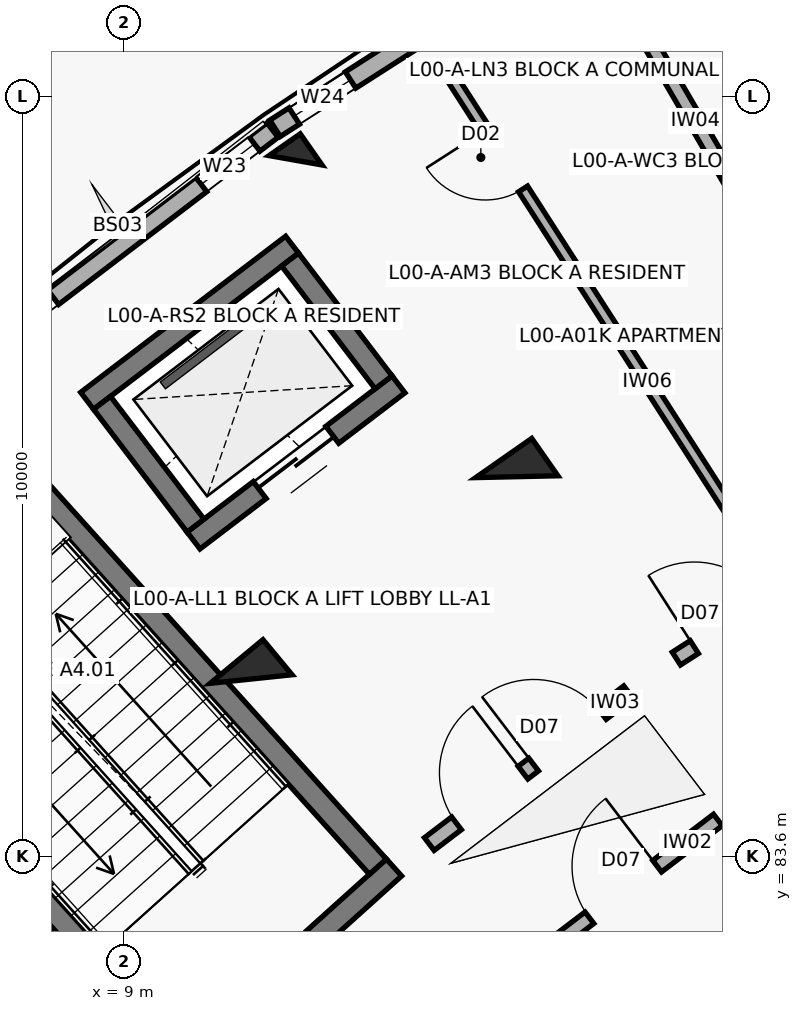
"""IFC4 building model, lengths in metres.
Left out: names, types, materials, properties, quantities, classifications, styles, units other than length and angle.
Written with IfcOpenShell. Run it as: python <this file> out.ifc"""

import sys

from ifc_helpers import new_model, si_unit, direction, frame, frame_2d, origin, origin_2d, place, context, subcontext, project, spatial, rectangle, extrude, element, fill, save


model = new_model("IFC4")
c1 = context("Model", 3, precision=1e-05, world=origin(), true_north=direction((0.0, 1.0)))
c2 = subcontext(c1, "Body", "Model", "MODEL_VIEW")
j1 = project(units=[si_unit("LENGTHUNIT", "METRE"), si_unit("PLANEANGLEUNIT", "RADIAN")], contexts=[c1])
p1 = place(None, origin())
s1 = spatial("IfcSite", under=j1, at=p1, CompositionType="ELEMENT")
p2 = place(p1, origin())
s2 = spatial("IfcBuilding", under=s1, at=p2, CompositionType="ELEMENT")
p3 = place(p2, origin())
s3 = spatial("IfcBuildingStorey", under=s2, at=p3, CompositionType="ELEMENT", Elevation=0.0)
for number, where, z_axis, x_axis in (
    (1, (10.678, 85.93, 0.0), (0.0, 0.0, 1.0), (-0.638, 0.77, 0.0)),
    (2, (14.172, 88.592, 0.0), (0.0, 0.0, 1.0), (-0.573, 0.82, 0.0)),
):
    element("IfcColumn", number, at=place(p3, frame(where, z_axis=z_axis, x_axis=x_axis)), inside=s3, PredefinedType="COLUMN", context=c2, shape_type="SweptSolid", body=[
        extrude(rectangle(XDim=0.6, YDim=0.9, at=origin_2d()), origin(), (0.0, 0.0, 1.0), 4.5),
    ])
p4 = place(p3, frame((11.261, 92.755, 0.0), z_axis=(0.0, 0.0, 1.0), x_axis=(-0.573004420611, 0.819552276527, 0.0)))
e3 = element("IfcColumn", 3, at=p4, inside=s3, PredefinedType="COLUMN", context=c2, shape_type="SweptSolid", body=[
    extrude(rectangle(XDim=0.5, YDim=0.5, at=origin_2d()), origin(), (0.0, 0.0, 1.0), 4.5),
])
p5 = place(p3, frame((7.134, 90.239, 0.0), z_axis=(0.0, 0.0, 1.0), x_axis=(0.795469013207, 0.605994264848, 0.0)))
e4 = element("IfcWall", 4, at=p5, inside=s3, PredefinedType="SOLIDWALL", context=c2, shape_type="SweptSolid", body=[
    extrude(rectangle(XDim=4.809, YDim=0.24, at=frame_2d((2.404, 0.0))), origin(), (0.0, 0.0, 1.0), 3.45),
])
p6 = place(p5, frame((0.3, 0.0, 0.3)))
e5 = element("IfcOpeningElement", 5, at=p6, cuts=e4, PredefinedType="OPENING", context=c2, shape_type="SweptSolid", body=[
    extrude(rectangle(XDim=0.88, YDim=1.42, at=frame_2d((0.44, 0.71))), frame((0.0, 0.13, 0.0), z_axis=(0.0, -1.0, 0.0), x_axis=(1.0, 0.0, 0.0)), (0.0, 0.0, 1.0), 0.26),
])
p7 = place(p5, frame((3.629, 0.0, 0.3)))
e6 = element("IfcOpeningElement", 6, at=p7, cuts=e4, PredefinedType="OPENING", context=c2, shape_type="SweptSolid", body=[
    extrude(rectangle(XDim=0.88, YDim=1.42, at=frame_2d((0.44, 0.71))), frame((0.0, 0.13, 0.0), z_axis=(0.0, -1.0, 0.0), x_axis=(1.0, 0.0, 0.0)), (0.0, 0.0, 1.0), 0.26),
])
p8 = place(p3, frame((10.992, 93.176, 0.0), z_axis=(0.0, 0.0, 1.0), x_axis=(0.84226218024, 0.539068103061, 0.0)))
e7 = element("IfcWall", 7, at=p8, inside=s3, PredefinedType="SOLIDWALL", context=c2, shape_type="SweptSolid", body=[
    extrude(rectangle(XDim=4.809, YDim=0.255, at=frame_2d((2.404, 0.0))), origin(), (0.0, 0.0, 1.0), 3.45),
])
p9 = place(p8, frame((0.3, 0.0, 0.3)))
e8 = element("IfcOpeningElement", 8, at=p9, cuts=e7, PredefinedType="OPENING", context=c2, shape_type="SweptSolid", body=[
    extrude(rectangle(XDim=0.88, YDim=1.56, at=frame_2d((0.44, 0.78))), frame((0.0, 0.137, 0.0), z_axis=(0.0, -1.0, 0.0), x_axis=(1.0, 0.0, 0.0)), (0.0, 0.0, 1.0), 0.275),
])
p10 = place(p8, frame((3.629, 0.0, 0.3)))
e9 = element("IfcOpeningElement", 9, at=p10, cuts=e7, PredefinedType="OPENING", context=c2, shape_type="SweptSolid", body=[
    extrude(rectangle(XDim=0.88, YDim=1.56, at=frame_2d((0.44, 0.78))), frame((0.0, 0.137, 0.0), z_axis=(0.0, -1.0, 0.0), x_axis=(1.0, 0.0, 0.0)), (0.0, 0.0, 1.0), 0.275),
])
p11 = place(p3, frame((12.557, 83.45, 0.0), z_axis=(0.0, 0.0, 1.0), x_axis=(-0.743375696158, -0.668874109501, 0.0)))
e10 = element("IfcWall", 10, at=p11, inside=s3, PredefinedType="SHEAR", context=c2, shape_type="SweptSolid", body=[
    extrude(rectangle(XDim=3.87, YDim=0.3, at=frame_2d((1.935, 0.0))), origin(), (0.0, 0.0, 1.0), 4.5),
])
p12 = place(p11, frame((1.41, 0.0, 0.0)))
e11 = element("IfcOpeningElement", 11, at=p12, cuts=e10, PredefinedType="OPENING", context=c2, shape_type="SweptSolid", body=[
    extrude(rectangle(XDim=1.05, YDim=2.15, at=frame_2d((0.525, 1.075))), frame((0.0, 0.16, 0.0), z_axis=(0.0, -1.0, 0.0), x_axis=(1.0, 0.0, 0.0)), (0.0, 0.0, 1.0), 0.32),
])
p13 = place(p3, frame((12.345, 83.461, 0.0), z_axis=(0.0, 0.0, 1.0), x_axis=(-0.668868253964, 0.743380964808, 0.0)))
e12 = element("IfcWall", 12, at=p13, inside=s3, PredefinedType="SHEAR", context=c2, shape_type="SweptSolid", body=[
    extrude(rectangle(XDim=7.69, YDim=0.3, at=frame_2d((3.845, 0.0))), origin(), (0.0, 0.0, 1.0), 4.5),
])
p14 = place(p3, frame((9.691, 81.073, 0.0), z_axis=(0.0, 0.0, 1.0), x_axis=(-0.668885797871, 0.743365179038, 0.0)))
e13 = element("IfcWall", 13, at=p14, inside=s3, PredefinedType="SHEAR", context=c2, shape_type="SweptSolid", body=[
    extrude(rectangle(XDim=7.69, YDim=0.3, at=frame_2d((3.845, 0.0))), origin(), (0.0, 0.0, 1.0), 4.5),
])
p15 = place(p3, frame((12.616, 89.807, 0.0), z_axis=(0.0, 0.0, 1.0), x_axis=(-0.795474703455, -0.605986795371, 0.0)))
e14 = element("IfcWall", 14, at=p15, inside=s3, PredefinedType="SHEAR", context=c2, shape_type="SweptSolid", body=[
    extrude(rectangle(XDim=3.39, YDim=0.28, at=frame_2d((1.695, 0.0))), origin(), (0.0, 0.0, 1.0), 4.5),
])
p16 = place(p15, frame((1.095, 0.0, 0.0)))
e15 = element("IfcOpeningElement", 15, at=p16, cuts=e14, PredefinedType="OPENING", context=c2, shape_type="SweptSolid", body=[
    extrude(rectangle(XDim=1.2, YDim=2.15, at=frame_2d((0.6, 1.075))), frame((0.0, 0.15, 0.0), z_axis=(0.0, -1.0, 0.0), x_axis=(1.0, 0.0, 0.0)), (0.0, 0.0, 1.0), 0.3),
])
p17 = place(p3, frame((11.216, 91.645, 0.0), z_axis=(0.0, 0.0, 1.0), x_axis=(-0.795439986025, -0.606032365994, 0.0)))
e16 = element("IfcWall", 16, at=p17, inside=s3, PredefinedType="SHEAR", context=c2, shape_type="SweptSolid", body=[
    extrude(rectangle(XDim=3.39, YDim=0.28, at=frame_2d((1.695, 0.0))), origin(), (0.0, 0.0, 1.0), 4.5),
])
p18 = place(p3, frame((12.42, 89.834, 0.0), z_axis=(0.0, 0.0, 1.0), x_axis=(-0.605948992168, 0.795503500238, 0.0)))
e17 = element("IfcWall", 17, at=p18, inside=s3, PredefinedType="SHEAR", context=c2, shape_type="SweptSolid", body=[
    extrude(rectangle(XDim=2.03, YDim=0.28, at=frame_2d((1.015, 0.0))), origin(), (0.0, 0.0, 1.0), 4.5),
])
p19 = place(p3, frame((9.946, 87.949, 0.0), z_axis=(0.0, 0.0, 1.0), x_axis=(-0.605891019062, 0.795547656033, 0.0)))
e18 = element("IfcWall", 18, at=p19, inside=s3, PredefinedType="SHEAR", context=c2, shape_type="SweptSolid", body=[
    extrude(rectangle(XDim=2.03, YDim=0.28, at=frame_2d((1.015, 0.0))), origin(), (0.0, 0.0, 1.0), 4.5),
])
p20 = place(p3, frame((13.021, 83.759, 0.0), z_axis=(0.0, 0.0, 1.0), x_axis=(0.795498026433, 0.605956178235, 0.0)))
e19 = element("IfcWall", 19, at=p20, inside=s3, PredefinedType="SOLIDWALL", context=c2, shape_type="SweptSolid", body=[
    extrude(rectangle(XDim=3.296, YDim=0.21, at=frame_2d((1.648, 0.0))), origin(), (0.0, 0.0, 1.0), 3.34),
])
p21 = place(p20, frame((0.45, 0.0, 0.0)))
e20 = element("IfcOpeningElement", 20, at=p21, cuts=e19, PredefinedType="OPENING", context=c2, shape_type="SweptSolid", body=[
    extrude(rectangle(XDim=1.1, YDim=2.15, at=frame_2d((0.55, 1.075))), frame((0.0, 0.115, 0.0), z_axis=(0.0, -1.0, 0.0), x_axis=(1.0, 0.0, 0.0)), (0.0, 0.0, 1.0), 0.23),
])
p22 = place(p20, frame((1.726, 0.0, 0.0)))
e21 = element("IfcOpeningElement", 21, at=p22, cuts=e19, PredefinedType="OPENING", context=c2, shape_type="SweptSolid", body=[
    extrude(rectangle(XDim=1.12, YDim=2.15, at=frame_2d((0.56, 1.075))), frame((0.0, 0.115, 0.0), z_axis=(0.0, -1.0, 0.0), x_axis=(1.0, 0.0, 0.0)), (0.0, 0.0, 1.0), 0.23),
])
p23 = place(p3, frame((14.329, 82.18, 0.0), z_axis=(0.0, 0.0, 1.0), x_axis=(0.795501577908, 0.605951515838, 0.0)))
e22 = element("IfcWall", 22, at=p23, inside=s3, PredefinedType="SOLIDWALL", context=c2, shape_type="SweptSolid", body=[
    extrude(rectangle(XDim=3.129, YDim=0.19, at=frame_2d((1.564, 0.0))), origin(), (0.0, 0.0, 1.0), 3.34),
])
p24 = place(p23, frame((1.004, 0.0, 0.0)))
e23 = element("IfcOpeningElement", 23, at=p24, cuts=e22, PredefinedType="OPENING", context=c2, shape_type="SweptSolid", body=[
    extrude(rectangle(XDim=1.12, YDim=2.15, at=frame_2d((0.56, 1.075))), frame((0.0, 0.105, 0.0), z_axis=(0.0, -1.0, 0.0), x_axis=(1.0, 0.0, 0.0)), (0.0, 0.0, 1.0), 0.21),
])
p25 = place(p3, frame((16.272, 86.199, 0.0), z_axis=(0.0, 0.0, 1.0), x_axis=(0.842257205985, 0.539075874963, 0.0)))
e24 = element("IfcWall", 24, at=p25, inside=s3, PredefinedType="SOLIDWALL", context=c2, shape_type="SweptSolid", body=[
    extrude(rectangle(XDim=3.436, YDim=0.2, at=frame_2d((1.718, 0.0))), origin(), (0.0, 0.0, 1.0), 3.34),
])
p26 = place(p25, frame((0.28, 0.0, 0.0)))
e25 = element("IfcOpeningElement", 25, at=p26, cuts=e24, PredefinedType="OPENING", context=c2, shape_type="SweptSolid", body=[
    extrude(rectangle(XDim=1.12, YDim=2.15, at=frame_2d((0.56, 1.075))), frame((0.0, 0.11, 0.0), z_axis=(0.0, -1.0, 0.0), x_axis=(1.0, 0.0, 0.0)), (0.0, 0.0, 1.0), 0.22),
])
p27 = place(p25, frame((2.266, 0.0, 0.0)))
e26 = element("IfcOpeningElement", 26, at=p27, cuts=e24, PredefinedType="OPENING", context=c2, shape_type="SweptSolid", body=[
    extrude(rectangle(XDim=0.95, YDim=2.1, at=frame_2d((0.475, 1.05))), frame((0.0, 0.11, 0.0), z_axis=(0.0, -1.0, 0.0), x_axis=(1.0, 0.0, 0.0)), (0.0, 0.0, 1.0), 0.22),
])
p28 = place(p3, frame((17.524, 87.288, 0.0), z_axis=(0.0, 0.0, 1.0), x_axis=(-0.540338452216, 0.841447774408, 0.0)))
e27 = element("IfcWall", 27, at=p28, inside=s3, PredefinedType="PARTITIONING", context=c2, shape_type="SweptSolid", body=[
    extrude(rectangle(XDim=7.95, YDim=0.14, at=frame_2d((3.975, 0.0))), origin(), (0.0, 0.0, 1.0), 3.34),
])
p29 = place(p28, frame((6.05, 0.0, 0.0)))
e28 = element("IfcOpeningElement", 28, at=p29, cuts=e27, PredefinedType="OPENING", context=c2, shape_type="SweptSolid", body=[
    extrude(rectangle(XDim=0.92, YDim=2.1, at=frame_2d((0.46, 1.05))), frame((0.0, 0.08, 0.0), z_axis=(0.0, -1.0, 0.0), x_axis=(1.0, 0.0, 0.0)), (0.0, 0.0, 1.0), 0.16),
])
p30 = place(p3, frame((17.621, 91.392, 0.0), z_axis=(0.0, 0.0, 1.0), x_axis=(-0.504216452091, 0.863577309475, 0.0)))
e29 = element("IfcWall", 29, at=p30, inside=s3, PredefinedType="SOLIDWALL", context=c2, shape_type="SweptSolid", body=[
    extrude(rectangle(XDim=4.35, YDim=0.185, at=frame_2d((2.175, 0.0))), origin(), (0.0, 0.0, 1.0), 3.34),
])
p31 = place(p6, origin())
e30 = element("IfcWindow", 30, at=p31, inside=s3, PartitioningType="DOUBLE_PANEL_VERTICAL", PredefinedType="WINDOW", context=c2, shape_type="SweptSolid", body=[
    extrude(rectangle(XDim=0.88, YDim=1.42, at=frame_2d((0.44, 0.71))), frame((0.0, 0.03, 0.0), z_axis=(0.0, -1.0, 0.0), x_axis=(1.0, 0.0, 0.0)), (0.0, 0.0, 1.0), 0.06),
])
fill(e5, e30)
p32 = place(p7, origin())
e31 = element("IfcWindow", 31, at=p32, inside=s3, PartitioningType="DOUBLE_PANEL_VERTICAL", PredefinedType="WINDOW", context=c2, shape_type="SweptSolid", body=[
    extrude(rectangle(XDim=0.88, YDim=1.42, at=frame_2d((0.44, 0.71))), frame((0.0, 0.03, 0.0), z_axis=(0.0, -1.0, 0.0), x_axis=(1.0, 0.0, 0.0)), (0.0, 0.0, 1.0), 0.06),
])
fill(e6, e31)
p33 = place(p9, origin())
e32 = element("IfcWindow", 32, at=p33, inside=s3, PartitioningType="DOUBLE_PANEL_VERTICAL", PredefinedType="WINDOW", context=c2, shape_type="SweptSolid", body=[
    extrude(rectangle(XDim=0.88, YDim=1.56, at=frame_2d((0.44, 0.78))), frame((0.0, 0.03, 0.0), z_axis=(0.0, -1.0, 0.0), x_axis=(1.0, 0.0, 0.0)), (0.0, 0.0, 1.0), 0.06),
])
fill(e8, e32)
p34 = place(p16, origin())
e33 = element("IfcDoor", 33, at=p34, inside=s3, OperationType="DOUBLE_DOOR_SLIDING", PredefinedType="DOOR", context=c2, shape_type="SweptSolid", body=[
    extrude(rectangle(XDim=1.2, YDim=2.15, at=frame_2d((0.6, 1.075))), frame((0.0, 0.025, 0.0), z_axis=(0.0, -1.0, 0.0), x_axis=(1.0, 0.0, 0.0)), (0.0, 0.0, 1.0), 0.05),
])
fill(e15, e33)
p35 = place(p21, origin())
e34 = element("IfcDoor", 34, at=p35, inside=s3, OperationType="SINGLE_SWING_RIGHT", PredefinedType="DOOR", context=c2, shape_type="SweptSolid", body=[
    extrude(rectangle(XDim=1.1, YDim=2.15, at=frame_2d((0.55, 1.075))), frame((0.0, 0.025, 0.0), z_axis=(0.0, -1.0, 0.0), x_axis=(1.0, 0.0, 0.0)), (0.0, 0.0, 1.0), 0.05),
])
fill(e20, e34)
p36 = place(p22, origin())
e35 = element("IfcDoor", 35, at=p36, inside=s3, OperationType="SINGLE_SWING_LEFT", PredefinedType="DOOR", context=c2, shape_type="SweptSolid", body=[
    extrude(rectangle(XDim=1.12, YDim=2.15, at=frame_2d((0.56, 1.075))), frame((0.0, 0.025, 0.0), z_axis=(0.0, -1.0, 0.0), x_axis=(1.0, 0.0, 0.0)), (0.0, 0.0, 1.0), 0.05),
])
fill(e21, e35)
p37 = place(p24, origin())
e36 = element("IfcDoor", 36, at=p37, inside=s3, OperationType="SINGLE_SWING_RIGHT", PredefinedType="DOOR", context=c2, shape_type="SweptSolid", body=[
    extrude(rectangle(XDim=1.12, YDim=2.15, at=frame_2d((0.56, 1.075))), frame((0.0, 0.025, 0.0), z_axis=(0.0, -1.0, 0.0), x_axis=(1.0, 0.0, 0.0)), (0.0, 0.0, 1.0), 0.05),
])
fill(e23, e36)
p38 = place(p26, origin())
e37 = element("IfcDoor", 37, at=p38, inside=s3, OperationType="SINGLE_SWING_LEFT", PredefinedType="DOOR", context=c2, shape_type="SweptSolid", body=[
    extrude(rectangle(XDim=1.12, YDim=2.15, at=frame_2d((0.56, 1.075))), frame((0.0, 0.025, 0.0), z_axis=(0.0, -1.0, 0.0), x_axis=(1.0, 0.0, 0.0)), (0.0, 0.0, 1.0), 0.05),
])
fill(e25, e37)
p39 = place(p29, origin())
e38 = element("IfcDoor", 38, at=p39, inside=s3, OperationType="SINGLE_SWING_RIGHT", PredefinedType="DOOR", context=c2, shape_type="SweptSolid", body=[
    extrude(rectangle(XDim=0.92, YDim=2.1, at=frame_2d((0.46, 1.05))), frame((0.0, 0.025, 0.0), z_axis=(0.0, -1.0, 0.0), x_axis=(1.0, 0.0, 0.0)), (0.0, 0.0, 1.0), 0.05),
])
fill(e28, e38)
save(model, sys.argv[1])
